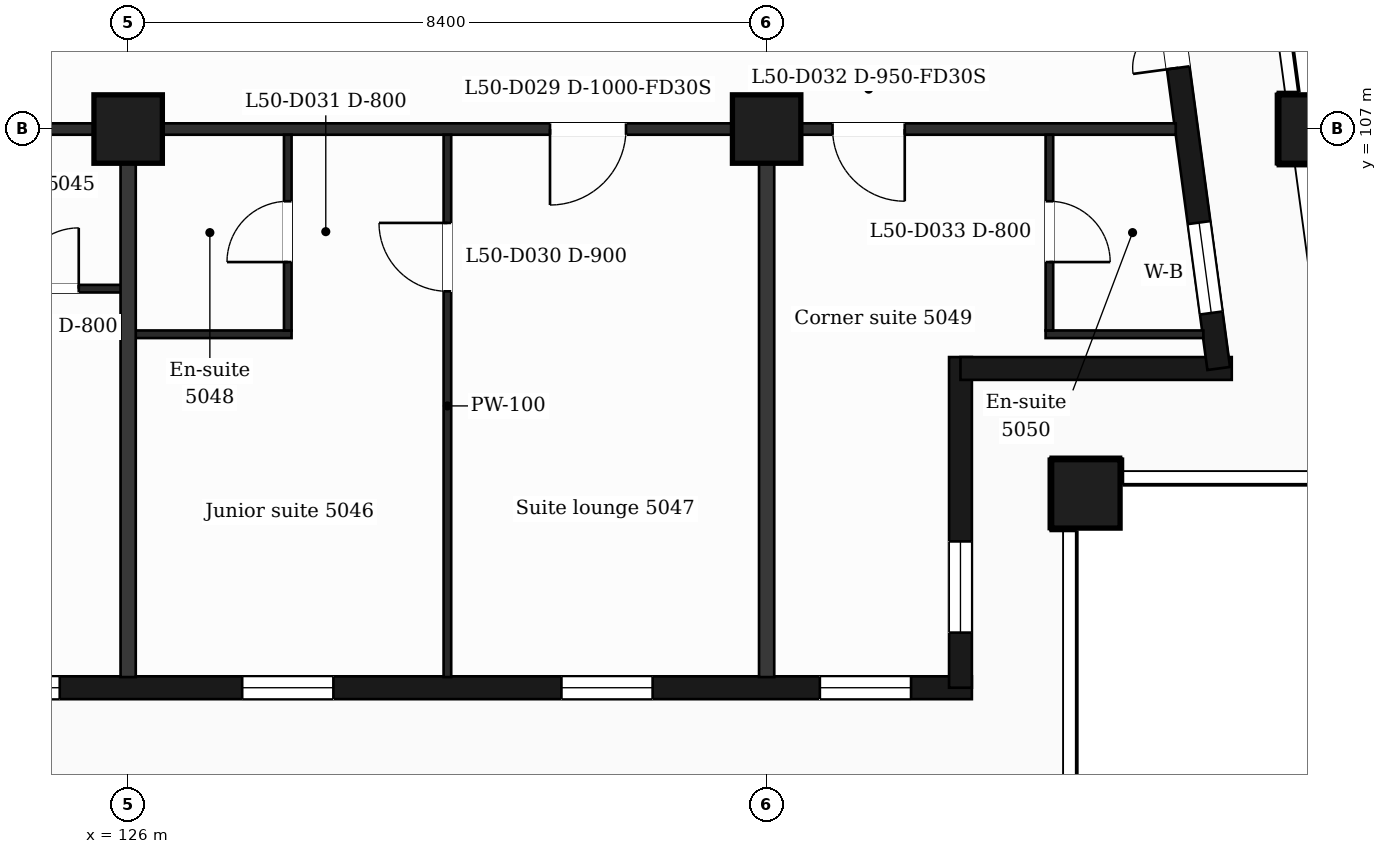
"""IFC4 building model, lengths in metres.
Left out: names, types, materials, properties, quantities, classifications, styles, units other than length and angle.
Written with IfcOpenShell. Run it as: python <this file> out.ifc"""

import sys

from ifc_helpers import new_model, si_unit, direction, frame, frame_2d, origin, origin_2d, place, context, subcontext, project, spatial, rectangle, extrude, element, fill, save


model = new_model("IFC4")
c1 = context("Model", 3, precision=1e-05, world=origin(), true_north=direction((0.0, 1.0)))
c2 = subcontext(c1, "Body", "Model", "MODEL_VIEW")
j1 = project(units=[si_unit("LENGTHUNIT", "METRE"), si_unit("PLANEANGLEUNIT", "RADIAN")], contexts=[c1])
p1 = place(None, origin())
s1 = spatial("IfcSite", under=j1, at=p1, CompositionType="ELEMENT")
p2 = place(p1, origin())
s2 = spatial("IfcBuilding", under=s1, at=p2, CompositionType="ELEMENT")
p3 = place(p2, frame((0.0, 0.0, 209.6)))
s3 = spatial("IfcBuildingStorey", under=s2, at=p3, CompositionType="ELEMENT", Elevation=209.6)
for number, where, z_axis, x_axis in (
    (1, (138.6, 102.2, 0.0), (0.0, 0.0, 1.0), (1.0, 0.0, 0.0)),
    (2, (126.0, 107.0, 0.0), (0.0, 0.0, 1.0), (1.0, 0.0, 0.0)),
    (3, (134.4, 107.0, 0.0), (0.0, 0.0, 1.0), (1.0, 0.0, 0.0)),
    (4, (141.588, 107.0, 0.0), (0.0, 0.0, 1.0), (1.0, 0.0, 0.0)),
):
    element("IfcColumn", number, at=place(p3, frame(where, z_axis=z_axis, x_axis=x_axis)), inside=s3, PredefinedType="COLUMN", context=c2, shape_type="SweptSolid", body=[
        extrude(rectangle(XDim=0.9, YDim=0.9, at=origin_2d()), origin(), (0.0, 0.0, 1.0), 3.7),
    ])
p4 = place(p3, frame((89.85, 99.65, 0.0), z_axis=(0.0, 0.0, 1.0), x_axis=(1.0, 0.0, 0.0)))
e5 = element("IfcWall", 5, at=p4, inside=s3, PredefinedType="SOLIDWALL", context=c2, shape_type="SweptSolid", body=[
    extrude(rectangle(XDim=47.25, YDim=0.3, at=frame_2d((23.625, 0.0))), origin(), (0.0, 0.0, 1.0), 3.38),
])
p5 = place(p4, frame((0.725, 0.0, 0.9)))
e6 = element("IfcOpeningElement", 6, at=p5, cuts=e5, PredefinedType="OPENING", context=c2, shape_type="SweptSolid", body=[
    extrude(rectangle(XDim=1.2, YDim=2.1, at=frame_2d((0.6, 1.05))), frame((0.0, 0.16, 0.0), z_axis=(0.0, -1.0, 0.0), x_axis=(1.0, 0.0, 0.0)), (0.0, 0.0, 1.0), 0.32),
])
p6 = place(p4, frame((3.45, 0.0, 0.9)))
e7 = element("IfcOpeningElement", 7, at=p6, cuts=e5, PredefinedType="OPENING", context=c2, shape_type="SweptSolid", body=[
    extrude(rectangle(XDim=2.4, YDim=2.1, at=frame_2d((1.2, 1.05))), frame((0.0, 0.16, 0.0), z_axis=(0.0, -1.0, 0.0), x_axis=(1.0, 0.0, 0.0)), (0.0, 0.0, 1.0), 0.32),
])
p7 = place(p4, frame((8.25, 0.0, 0.9)))
e8 = element("IfcOpeningElement", 8, at=p7, cuts=e5, PredefinedType="OPENING", context=c2, shape_type="SweptSolid", body=[
    extrude(rectangle(XDim=1.2, YDim=2.1, at=frame_2d((0.6, 1.05))), frame((0.0, 0.16, 0.0), z_axis=(0.0, -1.0, 0.0), x_axis=(1.0, 0.0, 0.0)), (0.0, 0.0, 1.0), 0.32),
])
p8 = place(p4, frame((12.45, 0.0, 0.9)))
e9 = element("IfcOpeningElement", 9, at=p8, cuts=e5, PredefinedType="OPENING", context=c2, shape_type="SweptSolid", body=[
    extrude(rectangle(XDim=1.2, YDim=2.1, at=frame_2d((0.6, 1.05))), frame((0.0, 0.16, 0.0), z_axis=(0.0, -1.0, 0.0), x_axis=(1.0, 0.0, 0.0)), (0.0, 0.0, 1.0), 0.32),
])
p9 = place(p4, frame((16.05, 0.0, 0.9)))
e10 = element("IfcOpeningElement", 10, at=p9, cuts=e5, PredefinedType="OPENING", context=c2, shape_type="SweptSolid", body=[
    extrude(rectangle(XDim=2.4, YDim=2.1, at=frame_2d((1.2, 1.05))), frame((0.0, 0.16, 0.0), z_axis=(0.0, -1.0, 0.0), x_axis=(1.0, 0.0, 0.0)), (0.0, 0.0, 1.0), 0.32),
])
p10 = place(p4, frame((20.25, 0.0, 0.9)))
e11 = element("IfcOpeningElement", 11, at=p10, cuts=e5, PredefinedType="OPENING", context=c2, shape_type="SweptSolid", body=[
    extrude(rectangle(XDim=2.4, YDim=2.1, at=frame_2d((1.2, 1.05))), frame((0.0, 0.16, 0.0), z_axis=(0.0, -1.0, 0.0), x_axis=(1.0, 0.0, 0.0)), (0.0, 0.0, 1.0), 0.32),
])
p11 = place(p4, frame((25.05, 0.0, 0.0)))
e12 = element("IfcOpeningElement", 12, at=p11, cuts=e5, PredefinedType="OPENING", context=c2, shape_type="SweptSolid", body=[
    extrude(rectangle(XDim=1.2, YDim=2.4, at=frame_2d((0.6, 1.2))), frame((0.0, 0.16, 0.0), z_axis=(0.0, -1.0, 0.0), x_axis=(1.0, 0.0, 0.0)), (0.0, 0.0, 1.0), 0.32),
])
p12 = place(p4, frame((28.65, 0.0, 0.9)))
e13 = element("IfcOpeningElement", 13, at=p12, cuts=e5, PredefinedType="OPENING", context=c2, shape_type="SweptSolid", body=[
    extrude(rectangle(XDim=2.4, YDim=2.1, at=frame_2d((1.2, 1.05))), frame((0.0, 0.16, 0.0), z_axis=(0.0, -1.0, 0.0), x_axis=(1.0, 0.0, 0.0)), (0.0, 0.0, 1.0), 0.32),
])
p13 = place(p4, frame((32.85, 0.0, 0.9)))
e14 = element("IfcOpeningElement", 14, at=p13, cuts=e5, PredefinedType="OPENING", context=c2, shape_type="SweptSolid", body=[
    extrude(rectangle(XDim=2.4, YDim=2.1, at=frame_2d((1.2, 1.05))), frame((0.0, 0.16, 0.0), z_axis=(0.0, -1.0, 0.0), x_axis=(1.0, 0.0, 0.0)), (0.0, 0.0, 1.0), 0.32),
])
p14 = place(p4, frame((37.65, 0.0, 0.9)))
e15 = element("IfcOpeningElement", 15, at=p14, cuts=e5, PredefinedType="OPENING", context=c2, shape_type="SweptSolid", body=[
    extrude(rectangle(XDim=1.2, YDim=2.1, at=frame_2d((0.6, 1.05))), frame((0.0, 0.16, 0.0), z_axis=(0.0, -1.0, 0.0), x_axis=(1.0, 0.0, 0.0)), (0.0, 0.0, 1.0), 0.32),
])
p15 = place(p4, frame((41.85, 0.0, 0.9)))
e16 = element("IfcOpeningElement", 16, at=p15, cuts=e5, PredefinedType="OPENING", context=c2, shape_type="SweptSolid", body=[
    extrude(rectangle(XDim=1.2, YDim=2.1, at=frame_2d((0.6, 1.05))), frame((0.0, 0.16, 0.0), z_axis=(0.0, -1.0, 0.0), x_axis=(1.0, 0.0, 0.0)), (0.0, 0.0, 1.0), 0.32),
])
p16 = place(p4, frame((45.25, 0.0, 0.9)))
e17 = element("IfcOpeningElement", 17, at=p16, cuts=e5, PredefinedType="OPENING", context=c2, shape_type="SweptSolid", body=[
    extrude(rectangle(XDim=1.2, YDim=2.1, at=frame_2d((0.6, 1.05))), frame((0.0, 0.16, 0.0), z_axis=(0.0, -1.0, 0.0), x_axis=(1.0, 0.0, 0.0)), (0.0, 0.0, 1.0), 0.32),
])
p17 = place(p3, frame((136.95, 99.65, 0.0), z_axis=(0.0, 0.0, 1.0), x_axis=(0.0, 1.0, 0.0)))
e18 = element("IfcWall", 18, at=p17, inside=s3, PredefinedType="SOLIDWALL", context=c2, shape_type="SweptSolid", body=[
    extrude(rectangle(XDim=4.35, YDim=0.3, at=frame_2d((2.175, 0.0))), origin(), (0.0, 0.0, 1.0), 3.38),
])
p18 = place(p17, frame((0.725, 0.0, 0.9)))
e19 = element("IfcOpeningElement", 19, at=p18, cuts=e18, PredefinedType="OPENING", context=c2, shape_type="SweptSolid", body=[
    extrude(rectangle(XDim=1.2, YDim=2.1, at=frame_2d((0.6, 1.05))), frame((0.0, 0.16, 0.0), z_axis=(0.0, -1.0, 0.0), x_axis=(1.0, 0.0, 0.0)), (0.0, 0.0, 1.0), 0.32),
])
p19 = place(p3, frame((136.95, 103.85, 0.0), z_axis=(0.0, 0.0, 1.0), x_axis=(1.0, 0.0, 0.0)))
e20 = element("IfcWall", 20, at=p19, inside=s3, PredefinedType="SOLIDWALL", context=c2, shape_type="SweptSolid", body=[
    extrude(rectangle(XDim=3.569, YDim=0.3, at=frame_2d((1.785, 0.0))), origin(), (0.0, 0.0, 1.0), 3.38),
])
p20 = place(p3, frame((140.348, 103.85, 0.0), z_axis=(0.0, 0.0, 1.0), x_axis=(-0.133431549479, 0.991058031401, 0.0)))
e21 = element("IfcWall", 21, at=p20, inside=s3, PredefinedType="SOLIDWALL", context=c2, shape_type="SweptSolid", body=[
    extrude(rectangle(XDim=6.609, YDim=0.3, at=frame_2d((3.304, 0.0))), origin(), (0.0, 0.0, 1.0), 3.38),
])
p21 = place(p20, frame((0.737, 0.0, 0.9)))
e22 = element("IfcOpeningElement", 22, at=p21, cuts=e21, PredefinedType="OPENING", context=c2, shape_type="SweptSolid", body=[
    extrude(rectangle(XDim=1.2, YDim=2.1, at=frame_2d((0.6, 1.05))), frame((0.0, 0.16, 0.0), z_axis=(0.0, -1.0, 0.0), x_axis=(1.0, 0.0, 0.0)), (0.0, 0.0, 1.0), 0.32),
])
p22 = place(p20, frame((3.991, 0.0, 0.0)))
e23 = element("IfcOpeningElement", 23, at=p22, cuts=e21, PredefinedType="OPENING", context=c2, shape_type="SweptSolid", body=[
    extrude(rectangle(XDim=1.2, YDim=2.4, at=frame_2d((0.6, 1.2))), frame((0.0, 0.16, 0.0), z_axis=(0.0, -1.0, 0.0), x_axis=(1.0, 0.0, 0.0)), (0.0, 0.0, 1.0), 0.32),
])
p23 = place(p3, frame((126.0, 104.3, 0.0), z_axis=(0.0, 0.0, 1.0), x_axis=(1.0, 0.0, 0.0)))
e24 = element("IfcWall", 24, at=p23, inside=s3, PredefinedType="PARTITIONING", context=c2, shape_type="SweptSolid", body=[
    extrude(rectangle(XDim=2.15, YDim=0.1, at=frame_2d((1.075, 0.0))), origin(), (0.0, 0.0, 1.0), 3.38),
])
p24 = place(p3, frame((138.07, 104.3, 0.0), z_axis=(0.0, 0.0, 1.0), x_axis=(1.0, 0.0, 0.0)))
e25 = element("IfcWall", 25, at=p24, inside=s3, PredefinedType="PARTITIONING", context=c2, shape_type="SweptSolid", body=[
    extrude(rectangle(XDim=2.076, YDim=0.1, at=frame_2d((1.038, 0.0))), origin(), (0.0, 0.0, 1.0), 3.38),
])
p25 = place(p3, frame((123.25, 104.9, 0.0), z_axis=(0.0, 0.0, 1.0), x_axis=(1.0, 0.0, 0.0)))
e26 = element("IfcWall", 26, at=p25, inside=s3, PredefinedType="PARTITIONING", context=c2, shape_type="SweptSolid", body=[
    extrude(rectangle(XDim=2.75, YDim=0.1, at=frame_2d((1.375, 0.0))), origin(), (0.0, 0.0, 1.0), 3.38),
])
p26 = place(p25, frame((1.3, 0.0, 0.0)))
e27 = element("IfcOpeningElement", 27, at=p26, cuts=e26, PredefinedType="OPENING", context=c2, shape_type="SweptSolid", body=[
    extrude(rectangle(XDim=0.8, YDim=2.1, at=frame_2d((0.4, 1.05))), frame((0.0, 0.06, 0.0), z_axis=(0.0, -1.0, 0.0), x_axis=(1.0, 0.0, 0.0)), (0.0, 0.0, 1.0), 0.12),
])
p27 = place(p3, frame((87.018, 107.0, 0.0), z_axis=(0.0, 0.0, 1.0), x_axis=(1.0, 0.0, 0.0)))
e28 = element("IfcWall", 28, at=p27, inside=s3, PredefinedType="PARTITIONING", context=c2, shape_type="SweptSolid", body=[
    extrude(rectangle(XDim=52.765, YDim=0.15, at=frame_2d((26.382, 0.0))), origin(), (0.0, 0.0, 1.0), 3.38),
])
p28 = place(p27, frame((1.276, 0.0, 0.0)))
e29 = element("IfcOpeningElement", 29, at=p28, cuts=e28, PredefinedType="OPENING", context=c2, shape_type="SweptSolid", body=[
    extrude(rectangle(XDim=0.95, YDim=2.1, at=frame_2d((0.475, 1.05))), frame((0.0, 0.085, 0.0), z_axis=(0.0, -1.0, 0.0), x_axis=(1.0, 0.0, 0.0)), (0.0, 0.0, 1.0), 0.17),
])
p29 = place(p27, frame((6.034, 0.0, 0.0)))
e30 = element("IfcOpeningElement", 30, at=p29, cuts=e28, PredefinedType="OPENING", context=c2, shape_type="SweptSolid", body=[
    extrude(rectangle(XDim=0.95, YDim=2.1, at=frame_2d((0.475, 1.05))), frame((0.0, 0.085, 0.0), z_axis=(0.0, -1.0, 0.0), x_axis=(1.0, 0.0, 0.0)), (0.0, 0.0, 1.0), 0.17),
])
p30 = place(p27, frame((15.445, 0.0, 0.0)))
e31 = element("IfcOpeningElement", 31, at=p30, cuts=e28, PredefinedType="OPENING", context=c2, shape_type="SweptSolid", body=[
    extrude(rectangle(XDim=0.95, YDim=2.1, at=frame_2d((0.475, 1.05))), frame((0.0, 0.085, 0.0), z_axis=(0.0, -1.0, 0.0), x_axis=(1.0, 0.0, 0.0)), (0.0, 0.0, 1.0), 0.17),
])
p31 = place(p27, frame((18.369, 0.0, 0.0)))
e32 = element("IfcOpeningElement", 32, at=p31, cuts=e28, PredefinedType="OPENING", context=c2, shape_type="SweptSolid", body=[
    extrude(rectangle(XDim=0.95, YDim=2.1, at=frame_2d((0.475, 1.05))), frame((0.0, 0.085, 0.0), z_axis=(0.0, -1.0, 0.0), x_axis=(1.0, 0.0, 0.0)), (0.0, 0.0, 1.0), 0.17),
])
p32 = place(p27, frame((24.519, 0.0, 0.0)))
e33 = element("IfcOpeningElement", 33, at=p32, cuts=e28, PredefinedType="OPENING", context=c2, shape_type="SweptSolid", body=[
    extrude(rectangle(XDim=0.95, YDim=2.1, at=frame_2d((0.475, 1.05))), frame((0.0, 0.085, 0.0), z_axis=(0.0, -1.0, 0.0), x_axis=(1.0, 0.0, 0.0)), (0.0, 0.0, 1.0), 0.17),
])
p33 = place(p27, frame((26.632, 0.0, 0.0)))
e34 = element("IfcOpeningElement", 34, at=p33, cuts=e28, PredefinedType="OPENING", context=c2, shape_type="SweptSolid", body=[
    extrude(rectangle(XDim=1.0, YDim=2.1, at=frame_2d((0.5, 1.05))), frame((0.0, 0.085, 0.0), z_axis=(0.0, -1.0, 0.0), x_axis=(1.0, 0.0, 0.0)), (0.0, 0.0, 1.0), 0.17),
])
p34 = place(p27, frame((33.422, 0.0, 0.0)))
e35 = element("IfcOpeningElement", 35, at=p34, cuts=e28, PredefinedType="OPENING", context=c2, shape_type="SweptSolid", body=[
    extrude(rectangle(XDim=0.95, YDim=2.1, at=frame_2d((0.475, 1.05))), frame((0.0, 0.085, 0.0), z_axis=(0.0, -1.0, 0.0), x_axis=(1.0, 0.0, 0.0)), (0.0, 0.0, 1.0), 0.17),
])
p35 = place(p27, frame((35.057, 0.0, 0.0)))
e36 = element("IfcOpeningElement", 36, at=p35, cuts=e28, PredefinedType="OPENING", context=c2, shape_type="SweptSolid", body=[
    extrude(rectangle(XDim=0.95, YDim=2.1, at=frame_2d((0.475, 1.05))), frame((0.0, 0.085, 0.0), z_axis=(0.0, -1.0, 0.0), x_axis=(1.0, 0.0, 0.0)), (0.0, 0.0, 1.0), 0.17),
])
p36 = place(p27, frame((44.532, 0.0, 0.0)))
e37 = element("IfcOpeningElement", 37, at=p36, cuts=e28, PredefinedType="OPENING", context=c2, shape_type="SweptSolid", body=[
    extrude(rectangle(XDim=1.0, YDim=2.1, at=frame_2d((0.5, 1.05))), frame((0.0, 0.085, 0.0), z_axis=(0.0, -1.0, 0.0), x_axis=(1.0, 0.0, 0.0)), (0.0, 0.0, 1.0), 0.17),
])
p37 = place(p27, frame((48.249, 0.0, 0.0)))
e38 = element("IfcOpeningElement", 38, at=p37, cuts=e28, PredefinedType="OPENING", context=c2, shape_type="SweptSolid", body=[
    extrude(rectangle(XDim=0.95, YDim=2.1, at=frame_2d((0.475, 1.05))), frame((0.0, 0.085, 0.0), z_axis=(0.0, -1.0, 0.0), x_axis=(1.0, 0.0, 0.0)), (0.0, 0.0, 1.0), 0.17),
])
p38 = place(p3, frame((126.0, 99.79, 0.0), z_axis=(0.0, 0.0, 1.0), x_axis=(0.0, 1.0, 0.0)))
e39 = element("IfcWall", 39, at=p38, inside=s3, PredefinedType="PARTITIONING", context=c2, shape_type="SweptSolid", body=[
    extrude(rectangle(XDim=7.135, YDim=0.2, at=frame_2d((3.567, 0.0))), origin(), (0.0, 0.0, 1.0), 3.38),
])
p39 = place(p3, frame((128.1, 104.35, 0.0), z_axis=(0.0, 0.0, 1.0), x_axis=(0.0, 1.0, 0.0)))
e40 = element("IfcWall", 40, at=p39, inside=s3, PredefinedType="PARTITIONING", context=c2, shape_type="SweptSolid", body=[
    extrude(rectangle(XDim=2.575, YDim=0.1, at=frame_2d((1.288, 0.0))), origin(), (0.0, 0.0, 1.0), 3.38),
])
p40 = place(p39, frame((0.9, 0.0, 0.0)))
e41 = element("IfcOpeningElement", 41, at=p40, cuts=e40, PredefinedType="OPENING", context=c2, shape_type="SweptSolid", body=[
    extrude(rectangle(XDim=0.8, YDim=2.1, at=frame_2d((0.4, 1.05))), frame((0.0, 0.06, 0.0), z_axis=(0.0, -1.0, 0.0), x_axis=(1.0, 0.0, 0.0)), (0.0, 0.0, 1.0), 0.12),
])
p41 = place(p3, frame((130.2, 99.79, 0.0), z_axis=(0.0, 0.0, 1.0), x_axis=(0.0, 1.0, 0.0)))
e42 = element("IfcWall", 42, at=p41, inside=s3, PredefinedType="PARTITIONING", context=c2, shape_type="SweptSolid", body=[
    extrude(rectangle(XDim=7.135, YDim=0.1, at=frame_2d((3.567, 0.0))), origin(), (0.0, 0.0, 1.0), 3.38),
])
p42 = place(p41, frame((5.075, 0.0, 0.0)))
e43 = element("IfcOpeningElement", 43, at=p42, cuts=e42, PredefinedType="OPENING", context=c2, shape_type="SweptSolid", body=[
    extrude(rectangle(XDim=0.9, YDim=2.1, at=frame_2d((0.45, 1.05))), frame((0.0, 0.06, 0.0), z_axis=(0.0, -1.0, 0.0), x_axis=(1.0, 0.0, 0.0)), (0.0, 0.0, 1.0), 0.12),
])
p43 = place(p3, frame((134.4, 99.79, 0.0), z_axis=(0.0, 0.0, 1.0), x_axis=(0.0, 1.0, 0.0)))
e44 = element("IfcWall", 44, at=p43, inside=s3, PredefinedType="PARTITIONING", context=c2, shape_type="SweptSolid", body=[
    extrude(rectangle(XDim=7.135, YDim=0.2, at=frame_2d((3.567, 0.0))), origin(), (0.0, 0.0, 1.0), 3.38),
])
p44 = place(p3, frame((138.12, 104.35, 0.0), z_axis=(0.0, 0.0, 1.0), x_axis=(0.0, 1.0, 0.0)))
e45 = element("IfcWall", 45, at=p44, inside=s3, PredefinedType="PARTITIONING", context=c2, shape_type="SweptSolid", body=[
    extrude(rectangle(XDim=2.575, YDim=0.1, at=frame_2d((1.288, 0.0))), origin(), (0.0, 0.0, 1.0), 3.38),
])
p45 = place(p44, frame((0.9, 0.0, 0.0)))
e46 = element("IfcOpeningElement", 46, at=p45, cuts=e45, PredefinedType="OPENING", context=c2, shape_type="SweptSolid", body=[
    extrude(rectangle(XDim=0.8, YDim=2.1, at=frame_2d((0.4, 1.05))), frame((0.0, 0.06, 0.0), z_axis=(0.0, -1.0, 0.0), x_axis=(1.0, 0.0, 0.0)), (0.0, 0.0, 1.0), 0.12),
])
p46 = place(p13, origin())
e47 = element("IfcWindow", 47, at=p46, inside=s3, PartitioningType="SINGLE_PANEL", PredefinedType="WINDOW", context=c2, shape_type="SweptSolid", body=[
    extrude(rectangle(XDim=2.4, YDim=2.1, at=frame_2d((1.2, 1.05))), frame((0.0, 0.03, 0.0), z_axis=(0.0, -1.0, 0.0), x_axis=(1.0, 0.0, 0.0)), (0.0, 0.0, 1.0), 0.06),
])
fill(e14, e47)
p47 = place(p14, origin())
e48 = element("IfcWindow", 48, at=p47, inside=s3, PartitioningType="SINGLE_PANEL", PredefinedType="WINDOW", context=c2, shape_type="SweptSolid", body=[
    extrude(rectangle(XDim=1.2, YDim=2.1, at=frame_2d((0.6, 1.05))), frame((0.0, 0.03, 0.0), z_axis=(0.0, -1.0, 0.0), x_axis=(1.0, 0.0, 0.0)), (0.0, 0.0, 1.0), 0.06),
])
fill(e15, e48)
p48 = place(p15, origin())
e49 = element("IfcWindow", 49, at=p48, inside=s3, PartitioningType="SINGLE_PANEL", PredefinedType="WINDOW", context=c2, shape_type="SweptSolid", body=[
    extrude(rectangle(XDim=1.2, YDim=2.1, at=frame_2d((0.6, 1.05))), frame((0.0, 0.03, 0.0), z_axis=(0.0, -1.0, 0.0), x_axis=(1.0, 0.0, 0.0)), (0.0, 0.0, 1.0), 0.06),
])
fill(e16, e49)
p49 = place(p16, origin())
e50 = element("IfcWindow", 50, at=p49, inside=s3, PartitioningType="SINGLE_PANEL", PredefinedType="WINDOW", context=c2, shape_type="SweptSolid", body=[
    extrude(rectangle(XDim=1.2, YDim=2.1, at=frame_2d((0.6, 1.05))), frame((0.0, 0.03, 0.0), z_axis=(0.0, -1.0, 0.0), x_axis=(1.0, 0.0, 0.0)), (0.0, 0.0, 1.0), 0.06),
])
fill(e17, e50)
p50 = place(p18, origin())
e51 = element("IfcWindow", 51, at=p50, inside=s3, PartitioningType="SINGLE_PANEL", PredefinedType="WINDOW", context=c2, shape_type="SweptSolid", body=[
    extrude(rectangle(XDim=1.2, YDim=2.1, at=frame_2d((0.6, 1.05))), frame((0.0, 0.03, 0.0), z_axis=(0.0, -1.0, 0.0), x_axis=(1.0, 0.0, 0.0)), (0.0, 0.0, 1.0), 0.06),
])
fill(e19, e51)
p51 = place(p21, origin())
e52 = element("IfcWindow", 52, at=p51, inside=s3, PartitioningType="SINGLE_PANEL", PredefinedType="WINDOW", context=c2, shape_type="SweptSolid", body=[
    extrude(rectangle(XDim=1.2, YDim=2.1, at=frame_2d((0.6, 1.05))), frame((0.0, 0.03, 0.0), z_axis=(0.0, -1.0, 0.0), x_axis=(1.0, 0.0, 0.0)), (0.0, 0.0, 1.0), 0.06),
])
fill(e22, e52)
p52 = place(p22, origin())
e53 = element("IfcDoor", 53, at=p52, inside=s3, OperationType="DOUBLE_DOOR_SINGLE_SWING", PredefinedType="DOOR", context=c2, shape_type="SweptSolid", body=[
    extrude(rectangle(XDim=1.2, YDim=2.4, at=frame_2d((0.6, 1.2))), frame((0.0, 0.025, 0.0), z_axis=(0.0, -1.0, 0.0), x_axis=(1.0, 0.0, 0.0)), (0.0, 0.0, 1.0), 0.05),
])
fill(e23, e53)
p53 = place(p26, origin())
e54 = element("IfcDoor", 54, at=p53, inside=s3, OperationType="SINGLE_SWING_RIGHT", PredefinedType="DOOR", context=c2, shape_type="SweptSolid", body=[
    extrude(rectangle(XDim=0.8, YDim=2.1, at=frame_2d((0.4, 1.05))), frame((0.0, 0.025, 0.0), z_axis=(0.0, -1.0, 0.0), x_axis=(1.0, 0.0, 0.0)), (0.0, 0.0, 1.0), 0.05),
])
fill(e27, e54)
p54 = place(p36, origin())
e55 = element("IfcDoor", 55, at=p54, inside=s3, OperationType="SINGLE_SWING_LEFT", PredefinedType="DOOR", context=c2, shape_type="SweptSolid", body=[
    extrude(rectangle(XDim=1.0, YDim=2.1, at=frame_2d((0.5, 1.05))), frame((0.0, 0.025, 0.0), z_axis=(0.0, -1.0, 0.0), x_axis=(1.0, 0.0, 0.0)), (0.0, 0.0, 1.0), 0.05),
])
fill(e37, e55)
p55 = place(p42, origin())
e56 = element("IfcDoor", 56, at=p55, inside=s3, OperationType="SINGLE_SWING_RIGHT", PredefinedType="DOOR", context=c2, shape_type="SweptSolid", body=[
    extrude(rectangle(XDim=0.9, YDim=2.1, at=frame_2d((0.45, 1.05))), frame((0.0, 0.025, 0.0), z_axis=(0.0, -1.0, 0.0), x_axis=(1.0, 0.0, 0.0)), (0.0, 0.0, 1.0), 0.05),
])
fill(e43, e56)
p56 = place(p40, origin())
e57 = element("IfcDoor", 57, at=p56, inside=s3, OperationType="SINGLE_SWING_LEFT", PredefinedType="DOOR", context=c2, shape_type="SweptSolid", body=[
    extrude(rectangle(XDim=0.8, YDim=2.1, at=frame_2d((0.4, 1.05))), frame((0.0, 0.025, 0.0), z_axis=(0.0, -1.0, 0.0), x_axis=(1.0, 0.0, 0.0)), (0.0, 0.0, 1.0), 0.05),
])
fill(e41, e57)
p57 = place(p37, origin())
e58 = element("IfcDoor", 58, at=p57, inside=s3, OperationType="SINGLE_SWING_RIGHT", PredefinedType="DOOR", context=c2, shape_type="SweptSolid", body=[
    extrude(rectangle(XDim=0.95, YDim=2.1, at=frame_2d((0.475, 1.05))), frame((0.0, 0.025, 0.0), z_axis=(0.0, -1.0, 0.0), x_axis=(1.0, 0.0, 0.0)), (0.0, 0.0, 1.0), 0.05),
])
fill(e38, e58)
p58 = place(p45, origin())
e59 = element("IfcDoor", 59, at=p58, inside=s3, OperationType="SINGLE_SWING_LEFT", PredefinedType="DOOR", context=c2, shape_type="SweptSolid", body=[
    extrude(rectangle(XDim=0.8, YDim=2.1, at=frame_2d((0.4, 1.05))), frame((0.0, 0.025, 0.0), z_axis=(0.0, -1.0, 0.0), x_axis=(1.0, 0.0, 0.0)), (0.0, 0.0, 1.0), 0.05),
])
fill(e46, e59)
save(model, sys.argv[1])
